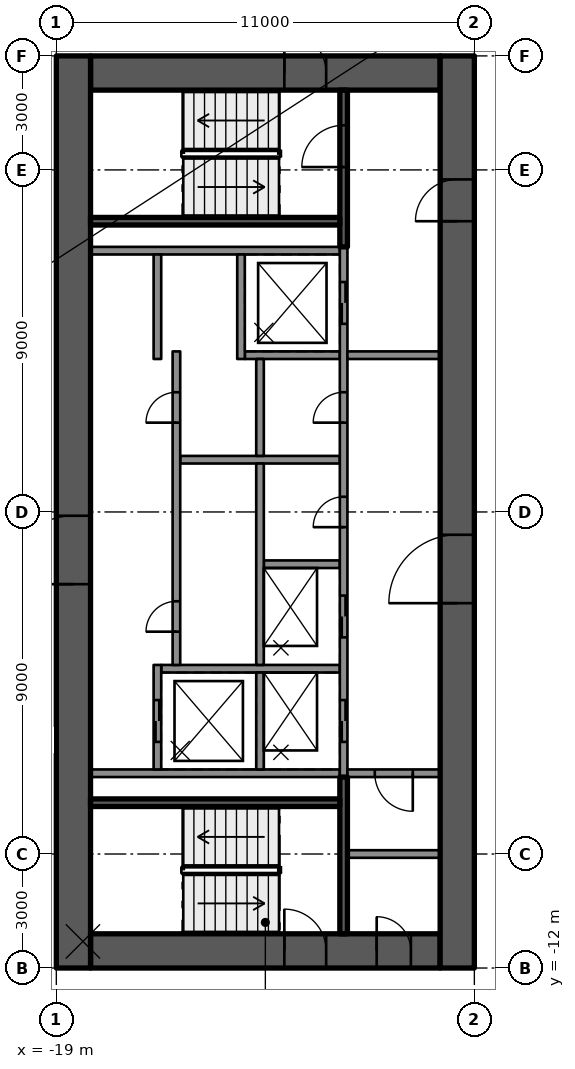
"""IFC4 building model, lengths in metres.
Left out: names, types, materials, properties, quantities, classifications, styles, units other than length and angle.
Written with IfcOpenShell. Run it as: python <this file> out.ifc"""

import sys

from ifc_helpers import new_model, si_unit, direction, frame, frame_2d, origin, place, context, subcontext, project, spatial, rectangle, extrude, element, fill, save


model = new_model("IFC4")
c1 = context("Model", 3, precision=1e-05, world=origin(), true_north=direction((0.0, 1.0)))
c2 = subcontext(c1, "Body", "Model", "MODEL_VIEW")
j1 = project(units=[si_unit("LENGTHUNIT", "METRE"), si_unit("PLANEANGLEUNIT", "RADIAN")], contexts=[c1])
p1 = place(None, origin())
s1 = spatial("IfcSite", under=j1, at=p1, CompositionType="ELEMENT")
p2 = place(p1, origin())
s2 = spatial("IfcBuilding", under=s1, at=p2, CompositionType="ELEMENT")
p3 = place(p2, frame((0.0, 0.0, 221.0)))
s3 = spatial("IfcBuildingStorey", under=s2, at=p3, CompositionType="ELEMENT", Elevation=221.0)
p4 = place(p3, frame((-18.1, 11.55, 0.0), z_axis=(0.0, 0.0, 1.0), x_axis=(1.0, 0.0, 0.0)))
e1 = element("IfcWall", 1, at=p4, inside=s3, PredefinedType="SHEAR", context=c2, shape_type="SweptSolid", body=[
    extrude(rectangle(XDim=9.2, YDim=0.9, at=frame_2d((4.6, 0.0))), origin(), (0.0, 0.0, 1.0), 3.5),
])
p5 = place(p4, frame((5.1, 0.0, 0.0)))
e2 = element("IfcOpeningElement", 2, at=p5, cuts=e1, PredefinedType="OPENING", context=c2, shape_type="SweptSolid", body=[
    extrude(rectangle(XDim=1.1, YDim=2.1, at=frame_2d((0.55, 1.05))), frame((0.0, 0.46, 0.0), z_axis=(0.0, -1.0, 0.0), x_axis=(1.0, 0.0, 0.0)), (0.0, 0.0, 1.0), 0.92),
])
p6 = place(p3, frame((-18.1, -11.55, 0.0), z_axis=(0.0, 0.0, 1.0), x_axis=(1.0, 0.0, 0.0)))
e3 = element("IfcWall", 3, at=p6, inside=s3, PredefinedType="SHEAR", context=c2, shape_type="SweptSolid", body=[
    extrude(rectangle(XDim=9.2, YDim=0.9, at=frame_2d((4.6, 0.0))), origin(), (0.0, 0.0, 1.0), 3.5),
])
p7 = place(p6, frame((5.1, 0.0, 0.0)))
e4 = element("IfcOpeningElement", 4, at=p7, cuts=e3, PredefinedType="OPENING", context=c2, shape_type="SweptSolid", body=[
    extrude(rectangle(XDim=1.1, YDim=2.1, at=frame_2d((0.55, 1.05))), frame((0.0, 0.46, 0.0), z_axis=(0.0, -1.0, 0.0), x_axis=(1.0, 0.0, 0.0)), (0.0, 0.0, 1.0), 0.92),
])
p8 = place(p6, frame((7.53, 0.0, 0.0)))
e5 = element("IfcOpeningElement", 5, at=p8, cuts=e3, PredefinedType="OPENING", context=c2, shape_type="SweptSolid", body=[
    extrude(rectangle(XDim=0.9, YDim=2.1, at=frame_2d((0.45, 1.05))), frame((0.0, 0.46, 0.0), z_axis=(0.0, -1.0, 0.0), x_axis=(1.0, 0.0, 0.0)), (0.0, 0.0, 1.0), 0.92),
])
p9 = place(p3, frame((-18.55, -12.0, 0.0), z_axis=(0.0, 0.0, 1.0), x_axis=(0.0, 1.0, 0.0)))
e6 = element("IfcWall", 6, at=p9, inside=s3, PredefinedType="SHEAR", context=c2, shape_type="SweptSolid", body=[
    extrude(rectangle(XDim=24.0, YDim=0.9, at=frame_2d((12.0, 0.0))), origin(), (0.0, 0.0, 1.0), 3.5),
])
p10 = place(p9, frame((10.1, 0.0, 0.0)))
e7 = element("IfcOpeningElement", 7, at=p10, cuts=e6, PredefinedType="OPENING", context=c2, shape_type="SweptSolid", body=[
    extrude(rectangle(XDim=1.8, YDim=2.1, at=frame_2d((0.9, 1.05))), frame((0.0, 0.46, 0.0), z_axis=(0.0, -1.0, 0.0), x_axis=(1.0, 0.0, 0.0)), (0.0, 0.0, 1.0), 0.92),
])
p11 = place(p3, frame((-8.45, -12.0, 0.0), z_axis=(0.0, 0.0, 1.0), x_axis=(0.0, 1.0, 0.0)))
e8 = element("IfcWall", 8, at=p11, inside=s3, PredefinedType="SHEAR", context=c2, shape_type="SweptSolid", body=[
    extrude(rectangle(XDim=24.0, YDim=0.9, at=frame_2d((12.0, 0.0))), origin(), (0.0, 0.0, 1.0), 3.5),
])
p12 = place(p11, frame((9.6, 0.0, 0.0)))
e9 = element("IfcOpeningElement", 9, at=p12, cuts=e8, PredefinedType="OPENING", context=c2, shape_type="SweptSolid", body=[
    extrude(rectangle(XDim=1.8, YDim=2.1, at=frame_2d((0.9, 1.05))), frame((0.0, 0.46, 0.0), z_axis=(0.0, -1.0, 0.0), x_axis=(1.0, 0.0, 0.0)), (0.0, 0.0, 1.0), 0.92),
])
p13 = place(p11, frame((19.65, 0.0, 0.0)))
e10 = element("IfcOpeningElement", 10, at=p13, cuts=e8, PredefinedType="OPENING", context=c2, shape_type="SweptSolid", body=[
    extrude(rectangle(XDim=1.1, YDim=2.1, at=frame_2d((0.55, 1.05))), frame((0.0, 0.46, 0.0), z_axis=(0.0, -1.0, 0.0), x_axis=(1.0, 0.0, 0.0)), (0.0, 0.0, 1.0), 0.92),
])
for number, where, z_axis, x_axis in (
    (11, (-11.54, 6.875, 0.0), (0.0, 0.0, 1.0), (-1.0, 0.0, 0.0)),
    (12, (-11.54, -6.875, 0.0), (0.0, 0.0, 1.0), (-1.0, 0.0, 0.0)),
):
    element("IfcWall", number, at=place(p3, frame(where, z_axis=z_axis, x_axis=x_axis)), inside=s3, PredefinedType="SOLIDWALL", context=c2, shape_type="SweptSolid", body=[
        extrude(rectangle(XDim=6.56, YDim=0.2, at=frame_2d((3.28, 0.0))), origin(), (0.0, 0.0, 1.0), 3.08),
    ])
p14 = place(p3, frame((-11.54, -4.125, 0.0), z_axis=(0.0, 0.0, 1.0), x_axis=(-1.0, 0.0, 0.0)))
e13 = element("IfcWall", 13, at=p14, inside=s3, PredefinedType="SOLIDWALL", context=c2, shape_type="SweptSolid", body=[
    extrude(rectangle(XDim=4.7, YDim=0.2, at=frame_2d((2.35, 0.0))), origin(), (0.0, 0.0, 1.0), 3.08),
])
p15 = place(p3, frame((-11.54, -1.375, 0.0), z_axis=(0.0, 0.0, 1.0), x_axis=(-1.0, 0.0, 0.0)))
e14 = element("IfcWall", 14, at=p15, inside=s3, PredefinedType="SOLIDWALL", context=c2, shape_type="SweptSolid", body=[
    extrude(rectangle(XDim=2.0, YDim=0.2, at=frame_2d((1.0, 0.0))), origin(), (0.0, 0.0, 1.0), 3.08),
])
p16 = place(p3, frame((-11.54, 1.375, 0.0), z_axis=(0.0, 0.0, 1.0), x_axis=(-1.0, 0.0, 0.0)))
e15 = element("IfcWall", 15, at=p16, inside=s3, PredefinedType="SOLIDWALL", context=c2, shape_type="SweptSolid", body=[
    extrude(rectangle(XDim=4.2, YDim=0.2, at=frame_2d((2.1, 0.0))), origin(), (0.0, 0.0, 1.0), 3.08),
])
p17 = place(p3, frame((-11.54, 4.125, 0.0), z_axis=(0.0, 0.0, 1.0), x_axis=(-1.0, 0.0, 0.0)))
e16 = element("IfcWall", 16, at=p17, inside=s3, PredefinedType="SOLIDWALL", context=c2, shape_type="SweptSolid", body=[
    extrude(rectangle(XDim=2.5, YDim=0.2, at=frame_2d((1.25, 0.0))), origin(), (0.0, 0.0, 1.0), 3.08),
])
p18 = place(p3, frame((-11.44, -6.975, 0.0), z_axis=(0.0, 0.0, 1.0), x_axis=(0.0, 1.0, 0.0)))
e17 = element("IfcWall", 17, at=p18, inside=s3, PredefinedType="SOLIDWALL", context=c2, shape_type="SweptSolid", body=[
    extrude(rectangle(XDim=13.95, YDim=0.2, at=frame_2d((6.975, 0.0))), origin(), (0.0, 0.0, 1.0), 3.08),
])
p19 = place(p18, frame((0.925, 0.0, 0.0)))
e18 = element("IfcOpeningElement", 18, at=p19, cuts=e17, PredefinedType="OPENING", context=c2, shape_type="SweptSolid", body=[
    extrude(rectangle(XDim=1.1, YDim=2.1, at=frame_2d((0.55, 1.05))), frame((0.0, 0.11, 0.0), z_axis=(0.0, -1.0, 0.0), x_axis=(1.0, 0.0, 0.0)), (0.0, 0.0, 1.0), 0.22),
])
p20 = place(p18, frame((3.675, 0.0, 0.0)))
e19 = element("IfcOpeningElement", 19, at=p20, cuts=e17, PredefinedType="OPENING", context=c2, shape_type="SweptSolid", body=[
    extrude(rectangle(XDim=1.1, YDim=2.1, at=frame_2d((0.55, 1.05))), frame((0.0, 0.11, 0.0), z_axis=(0.0, -1.0, 0.0), x_axis=(1.0, 0.0, 0.0)), (0.0, 0.0, 1.0), 0.22),
])
p21 = place(p18, frame((11.925, 0.0, 0.0)))
e20 = element("IfcOpeningElement", 20, at=p21, cuts=e17, PredefinedType="OPENING", context=c2, shape_type="SweptSolid", body=[
    extrude(rectangle(XDim=1.1, YDim=2.1, at=frame_2d((0.55, 1.05))), frame((0.0, 0.11, 0.0), z_axis=(0.0, -1.0, 0.0), x_axis=(1.0, 0.0, 0.0)), (0.0, 0.0, 1.0), 0.22),
])
p22 = place(p18, frame((6.575, 0.0, 0.0)))
e21 = element("IfcOpeningElement", 21, at=p22, cuts=e17, PredefinedType="OPENING", context=c2, shape_type="SweptSolid", body=[
    extrude(rectangle(XDim=0.8, YDim=2.1, at=frame_2d((0.4, 1.05))), frame((0.0, 0.11, 0.0), z_axis=(0.0, -1.0, 0.0), x_axis=(1.0, 0.0, 0.0)), (0.0, 0.0, 1.0), 0.22),
])
p23 = place(p18, frame((9.325, 0.0, 0.0)))
e22 = element("IfcOpeningElement", 22, at=p23, cuts=e17, PredefinedType="OPENING", context=c2, shape_type="SweptSolid", body=[
    extrude(rectangle(XDim=0.8, YDim=2.1, at=frame_2d((0.4, 1.05))), frame((0.0, 0.11, 0.0), z_axis=(0.0, -1.0, 0.0), x_axis=(1.0, 0.0, 0.0)), (0.0, 0.0, 1.0), 0.22),
])
p24 = place(p3, frame((-13.64, -6.775, 0.0), z_axis=(0.0, 0.0, 1.0), x_axis=(0.0, 1.0, 0.0)))
e23 = element("IfcWall", 23, at=p24, inside=s3, PredefinedType="SOLIDWALL", context=c2, shape_type="SweptSolid", body=[
    extrude(rectangle(XDim=2.55, YDim=0.2, at=frame_2d((1.275, 0.0))), origin(), (0.0, 0.0, 1.0), 3.08),
])
p25 = place(p3, frame((-13.64, -4.025, 0.0), z_axis=(0.0, 0.0, 1.0), x_axis=(0.0, 1.0, 0.0)))
e24 = element("IfcWall", 24, at=p25, inside=s3, PredefinedType="SOLIDWALL", context=c2, shape_type="SweptSolid", body=[
    extrude(rectangle(XDim=5.3, YDim=0.2, at=frame_2d((2.65, 0.0))), origin(), (0.0, 0.0, 1.0), 3.08),
])
p26 = place(p3, frame((-13.64, 1.475, 0.0), z_axis=(0.0, 0.0, 1.0), x_axis=(0.0, 1.0, 0.0)))
e25 = element("IfcWall", 25, at=p26, inside=s3, PredefinedType="SOLIDWALL", context=c2, shape_type="SweptSolid", body=[
    extrude(rectangle(XDim=2.55, YDim=0.2, at=frame_2d((1.275, 0.0))), origin(), (0.0, 0.0, 1.0), 3.08),
])
p27 = place(p3, frame((-14.14, 4.025, 0.0), z_axis=(0.0, 0.0, 1.0), x_axis=(0.0, 1.0, 0.0)))
e26 = element("IfcWall", 26, at=p27, inside=s3, PredefinedType="SOLIDWALL", context=c2, shape_type="SweptSolid", body=[
    extrude(rectangle(XDim=2.75, YDim=0.2, at=frame_2d((1.375, 0.0))), origin(), (0.0, 0.0, 1.0), 3.08),
])
p28 = place(p3, frame((-16.34, -6.775, 0.0), z_axis=(0.0, 0.0, 1.0), x_axis=(0.0, 1.0, 0.0)))
e27 = element("IfcWall", 27, at=p28, inside=s3, PredefinedType="SOLIDWALL", context=c2, shape_type="SweptSolid", body=[
    extrude(rectangle(XDim=2.75, YDim=0.2, at=frame_2d((1.375, 0.0))), origin(), (0.0, 0.0, 1.0), 3.08),
])
p29 = place(p28, frame((0.725, 0.0, 0.0)))
e28 = element("IfcOpeningElement", 28, at=p29, cuts=e27, PredefinedType="OPENING", context=c2, shape_type="SweptSolid", body=[
    extrude(rectangle(XDim=1.1, YDim=2.1, at=frame_2d((0.55, 1.05))), frame((0.0, 0.11, 0.0), z_axis=(0.0, -1.0, 0.0), x_axis=(1.0, 0.0, 0.0)), (0.0, 0.0, 1.0), 0.22),
])
p30 = place(p3, frame((-15.84, -4.025, 0.0), z_axis=(0.0, 0.0, 1.0), x_axis=(0.0, 1.0, 0.0)))
e29 = element("IfcWall", 29, at=p30, inside=s3, PredefinedType="SOLIDWALL", context=c2, shape_type="SweptSolid", body=[
    extrude(rectangle(XDim=8.25, YDim=0.2, at=frame_2d((4.125, 0.0))), origin(), (0.0, 0.0, 1.0), 3.08),
])
p31 = place(p30, frame((0.875, 0.0, 0.0)))
e30 = element("IfcOpeningElement", 30, at=p31, cuts=e29, PredefinedType="OPENING", context=c2, shape_type="SweptSolid", body=[
    extrude(rectangle(XDim=0.8, YDim=2.1, at=frame_2d((0.4, 1.05))), frame((0.0, 0.11, 0.0), z_axis=(0.0, -1.0, 0.0), x_axis=(1.0, 0.0, 0.0)), (0.0, 0.0, 1.0), 0.22),
])
p32 = place(p30, frame((6.375, 0.0, 0.0)))
e31 = element("IfcOpeningElement", 31, at=p32, cuts=e29, PredefinedType="OPENING", context=c2, shape_type="SweptSolid", body=[
    extrude(rectangle(XDim=0.8, YDim=2.1, at=frame_2d((0.4, 1.05))), frame((0.0, 0.11, 0.0), z_axis=(0.0, -1.0, 0.0), x_axis=(1.0, 0.0, 0.0)), (0.0, 0.0, 1.0), 0.22),
])
p33 = place(p3, frame((-16.34, 4.025, 0.0), z_axis=(0.0, 0.0, 1.0), x_axis=(0.0, 1.0, 0.0)))
e32 = element("IfcWall", 32, at=p33, inside=s3, PredefinedType="SOLIDWALL", context=c2, shape_type="SweptSolid", body=[
    extrude(rectangle(XDim=2.75, YDim=0.2, at=frame_2d((1.375, 0.0))), origin(), (0.0, 0.0, 1.0), 3.08),
])
p34 = place(p3, frame((-11.44, 6.975, 0.0), z_axis=(0.0, 0.0, 1.0), x_axis=(0.0, 1.0, 0.0)))
e33 = element("IfcWall", 33, at=p34, inside=s3, PredefinedType="SOLIDWALL", context=c2, shape_type="SweptSolid", body=[
    extrude(rectangle(XDim=4.125, YDim=0.2, at=frame_2d((2.062, 0.0))), origin(), (0.0, 0.0, 1.0), 3.08),
])
p35 = place(p34, frame((2.1, 0.0, 0.0)))
e34 = element("IfcOpeningElement", 34, at=p35, cuts=e33, PredefinedType="OPENING", context=c2, shape_type="SweptSolid", body=[
    extrude(rectangle(XDim=1.1, YDim=2.1, at=frame_2d((0.55, 1.05))), frame((0.0, 0.11, 0.0), z_axis=(0.0, -1.0, 0.0), x_axis=(1.0, 0.0, 0.0)), (0.0, 0.0, 1.0), 0.22),
])
p36 = place(p3, frame((-11.54, 7.65, 0.0), z_axis=(0.0, 0.0, 1.0), x_axis=(-1.0, 0.0, 0.0)))
e35 = element("IfcWall", 35, at=p36, inside=s3, PredefinedType="SOLIDWALL", context=c2, shape_type="SweptSolid", body=[
    extrude(rectangle(XDim=6.56, YDim=0.2, at=frame_2d((3.28, 0.0))), origin(), (0.0, 0.0, 1.0), 3.08),
])
p37 = place(p3, frame((-11.44, -11.1, 0.0), z_axis=(0.0, 0.0, 1.0), x_axis=(0.0, 1.0, 0.0)))
e36 = element("IfcWall", 36, at=p37, inside=s3, PredefinedType="SOLIDWALL", context=c2, shape_type="SweptSolid", body=[
    extrude(rectangle(XDim=4.125, YDim=0.2, at=frame_2d((2.062, 0.0))), origin(), (0.0, 0.0, 1.0), 3.08),
])
p38 = place(p3, frame((-11.54, -7.65, 0.0), z_axis=(0.0, 0.0, 1.0), x_axis=(-1.0, 0.0, 0.0)))
e37 = element("IfcWall", 37, at=p38, inside=s3, PredefinedType="SOLIDWALL", context=c2, shape_type="SweptSolid", body=[
    extrude(rectangle(XDim=6.56, YDim=0.2, at=frame_2d((3.28, 0.0))), origin(), (0.0, 0.0, 1.0), 3.08),
])
p39 = place(p3, frame((-8.9, 4.125, 0.0), z_axis=(0.0, 0.0, 1.0), x_axis=(-1.0, 0.0, 0.0)))
e38 = element("IfcWall", 38, at=p39, inside=s3, PredefinedType="PARTITIONING", context=c2, shape_type="SweptSolid", body=[
    extrude(rectangle(XDim=2.44, YDim=0.2, at=frame_2d((1.22, 0.0))), origin(), (0.0, 0.0, 1.0), 3.08),
])
p40 = place(p3, frame((-8.9, -6.875, 0.0), z_axis=(0.0, 0.0, 1.0), x_axis=(-1.0, 0.0, 0.0)))
e39 = element("IfcWall", 39, at=p40, inside=s3, PredefinedType="PARTITIONING", context=c2, shape_type="SweptSolid", body=[
    extrude(rectangle(XDim=2.44, YDim=0.2, at=frame_2d((1.22, 0.0))), origin(), (0.0, 0.0, 1.0), 3.08),
])
p41 = place(p40, frame((0.72, 0.0, 0.0)))
e40 = element("IfcOpeningElement", 40, at=p41, cuts=e39, PredefinedType="OPENING", context=c2, shape_type="SweptSolid", body=[
    extrude(rectangle(XDim=1.0, YDim=2.1, at=frame_2d((0.5, 1.05))), frame((0.0, 0.11, 0.0), z_axis=(0.0, -1.0, 0.0), x_axis=(1.0, 0.0, 0.0)), (0.0, 0.0, 1.0), 0.22),
])
p42 = place(p3, frame((-8.9, -9.0, 0.0), z_axis=(0.0, 0.0, 1.0), x_axis=(-1.0, 0.0, 0.0)))
e41 = element("IfcWall", 41, at=p42, inside=s3, PredefinedType="PARTITIONING", context=c2, shape_type="SweptSolid", body=[
    extrude(rectangle(XDim=2.44, YDim=0.2, at=frame_2d((1.22, 0.0))), origin(), (0.0, 0.0, 1.0), 3.08),
])
p43 = place(p19, origin())
e42 = element("IfcDoor", 42, at=p43, inside=s3, OperationType="DOUBLE_DOOR_SLIDING", PredefinedType="DOOR", context=c2, shape_type="SweptSolid", body=[
    extrude(rectangle(XDim=1.1, YDim=2.1, at=frame_2d((0.55, 1.05))), frame((0.0, 0.025, 0.0), z_axis=(0.0, -1.0, 0.0), x_axis=(1.0, 0.0, 0.0)), (0.0, 0.0, 1.0), 0.05),
])
fill(e18, e42)
p44 = place(p29, origin())
e43 = element("IfcDoor", 43, at=p44, inside=s3, OperationType="DOUBLE_DOOR_SLIDING", PredefinedType="DOOR", context=c2, shape_type="SweptSolid", body=[
    extrude(rectangle(XDim=1.1, YDim=2.1, at=frame_2d((0.55, 1.05))), frame((0.0, 0.025, 0.0), z_axis=(0.0, -1.0, 0.0), x_axis=(1.0, 0.0, 0.0)), (0.0, 0.0, 1.0), 0.05),
])
fill(e28, e43)
p45 = place(p20, origin())
e44 = element("IfcDoor", 44, at=p45, inside=s3, OperationType="DOUBLE_DOOR_SLIDING", PredefinedType="DOOR", context=c2, shape_type="SweptSolid", body=[
    extrude(rectangle(XDim=1.1, YDim=2.1, at=frame_2d((0.55, 1.05))), frame((0.0, 0.025, 0.0), z_axis=(0.0, -1.0, 0.0), x_axis=(1.0, 0.0, 0.0)), (0.0, 0.0, 1.0), 0.05),
])
fill(e19, e44)
p46 = place(p21, origin())
e45 = element("IfcDoor", 45, at=p46, inside=s3, OperationType="DOUBLE_DOOR_SLIDING", PredefinedType="DOOR", context=c2, shape_type="SweptSolid", body=[
    extrude(rectangle(XDim=1.1, YDim=2.1, at=frame_2d((0.55, 1.05))), frame((0.0, 0.025, 0.0), z_axis=(0.0, -1.0, 0.0), x_axis=(1.0, 0.0, 0.0)), (0.0, 0.0, 1.0), 0.05),
])
fill(e20, e45)
p47 = place(p31, origin())
e46 = element("IfcDoor", 46, at=p47, inside=s3, OperationType="SINGLE_SWING_LEFT", PredefinedType="DOOR", context=c2, shape_type="SweptSolid", body=[
    extrude(rectangle(XDim=0.8, YDim=2.1, at=frame_2d((0.4, 1.05))), frame((0.0, 0.025, 0.0), z_axis=(0.0, -1.0, 0.0), x_axis=(1.0, 0.0, 0.0)), (0.0, 0.0, 1.0), 0.05),
])
fill(e30, e46)
p48 = place(p22, origin())
e47 = element("IfcDoor", 47, at=p48, inside=s3, OperationType="SINGLE_SWING_LEFT", PredefinedType="DOOR", context=c2, shape_type="SweptSolid", body=[
    extrude(rectangle(XDim=0.8, YDim=2.1, at=frame_2d((0.4, 1.05))), frame((0.0, 0.025, 0.0), z_axis=(0.0, -1.0, 0.0), x_axis=(1.0, 0.0, 0.0)), (0.0, 0.0, 1.0), 0.05),
])
fill(e21, e47)
p49 = place(p23, origin())
e48 = element("IfcDoor", 48, at=p49, inside=s3, OperationType="SINGLE_SWING_LEFT", PredefinedType="DOOR", context=c2, shape_type="SweptSolid", body=[
    extrude(rectangle(XDim=0.8, YDim=2.1, at=frame_2d((0.4, 1.05))), frame((0.0, 0.025, 0.0), z_axis=(0.0, -1.0, 0.0), x_axis=(1.0, 0.0, 0.0)), (0.0, 0.0, 1.0), 0.05),
])
fill(e22, e48)
p50 = place(p32, origin())
e49 = element("IfcDoor", 49, at=p50, inside=s3, OperationType="SINGLE_SWING_LEFT", PredefinedType="DOOR", context=c2, shape_type="SweptSolid", body=[
    extrude(rectangle(XDim=0.8, YDim=2.1, at=frame_2d((0.4, 1.05))), frame((0.0, 0.025, 0.0), z_axis=(0.0, -1.0, 0.0), x_axis=(1.0, 0.0, 0.0)), (0.0, 0.0, 1.0), 0.05),
])
fill(e31, e49)
p51 = place(p12, origin())
e50 = element("IfcDoor", 50, at=p51, inside=s3, OperationType="SINGLE_SWING_LEFT", PredefinedType="DOOR", context=c2, shape_type="SweptSolid", body=[
    extrude(rectangle(XDim=1.8, YDim=2.1, at=frame_2d((0.9, 1.05))), frame((0.0, 0.025, 0.0), z_axis=(0.0, -1.0, 0.0), x_axis=(1.0, 0.0, 0.0)), (0.0, 0.0, 1.0), 0.05),
])
fill(e9, e50)
p52 = place(p10, origin())
e51 = element("IfcDoor", 51, at=p52, inside=s3, OperationType="SINGLE_SWING_LEFT", PredefinedType="DOOR", context=c2, shape_type="SweptSolid", body=[
    extrude(rectangle(XDim=1.8, YDim=2.1, at=frame_2d((0.9, 1.05))), frame((0.0, 0.025, 0.0), z_axis=(0.0, -1.0, 0.0), x_axis=(1.0, 0.0, 0.0)), (0.0, 0.0, 1.0), 0.05),
])
fill(e7, e51)
p53 = place(p13, origin())
e52 = element("IfcDoor", 52, at=p53, inside=s3, OperationType="SINGLE_SWING_RIGHT", PredefinedType="DOOR", context=c2, shape_type="SweptSolid", body=[
    extrude(rectangle(XDim=1.1, YDim=2.1, at=frame_2d((0.55, 1.05))), frame((0.0, 0.025, 0.0), z_axis=(0.0, -1.0, 0.0), x_axis=(1.0, 0.0, 0.0)), (0.0, 0.0, 1.0), 0.05),
])
fill(e10, e52)
p54 = place(p5, origin())
e53 = element("IfcDoor", 53, at=p54, inside=s3, OperationType="SINGLE_SWING_RIGHT", PredefinedType="DOOR", context=c2, shape_type="SweptSolid", body=[
    extrude(rectangle(XDim=1.1, YDim=2.1, at=frame_2d((0.55, 1.05))), frame((0.0, 0.025, 0.0), z_axis=(0.0, -1.0, 0.0), x_axis=(1.0, 0.0, 0.0)), (0.0, 0.0, 1.0), 0.05),
])
fill(e2, e53)
p55 = place(p7, origin())
e54 = element("IfcDoor", 54, at=p55, inside=s3, OperationType="SINGLE_SWING_RIGHT", PredefinedType="DOOR", context=c2, shape_type="SweptSolid", body=[
    extrude(rectangle(XDim=1.1, YDim=2.1, at=frame_2d((0.55, 1.05))), frame((0.0, 0.025, 0.0), z_axis=(0.0, -1.0, 0.0), x_axis=(1.0, 0.0, 0.0)), (0.0, 0.0, 1.0), 0.05),
])
fill(e4, e54)
p56 = place(p35, origin())
e55 = element("IfcDoor", 55, at=p56, inside=s3, OperationType="SINGLE_SWING_RIGHT", PredefinedType="DOOR", context=c2, shape_type="SweptSolid", body=[
    extrude(rectangle(XDim=1.1, YDim=2.1, at=frame_2d((0.55, 1.05))), frame((0.0, 0.025, 0.0), z_axis=(0.0, -1.0, 0.0), x_axis=(1.0, 0.0, 0.0)), (0.0, 0.0, 1.0), 0.05),
])
fill(e34, e55)
p57 = place(p8, origin())
e56 = element("IfcDoor", 56, at=p57, inside=s3, OperationType="SINGLE_SWING_RIGHT", PredefinedType="DOOR", context=c2, shape_type="SweptSolid", body=[
    extrude(rectangle(XDim=0.9, YDim=2.1, at=frame_2d((0.45, 1.05))), frame((0.0, 0.025, 0.0), z_axis=(0.0, -1.0, 0.0), x_axis=(1.0, 0.0, 0.0)), (0.0, 0.0, 1.0), 0.05),
])
fill(e5, e56)
p58 = place(p41, origin())
e57 = element("IfcDoor", 57, at=p58, inside=s3, OperationType="SINGLE_SWING_RIGHT", PredefinedType="DOOR", context=c2, shape_type="SweptSolid", body=[
    extrude(rectangle(XDim=1.0, YDim=2.1, at=frame_2d((0.5, 1.05))), frame((0.0, 0.025, 0.0), z_axis=(0.0, -1.0, 0.0), x_axis=(1.0, 0.0, 0.0)), (0.0, 0.0, 1.0), 0.05),
])
fill(e40, e57)
save(model, sys.argv[1])
